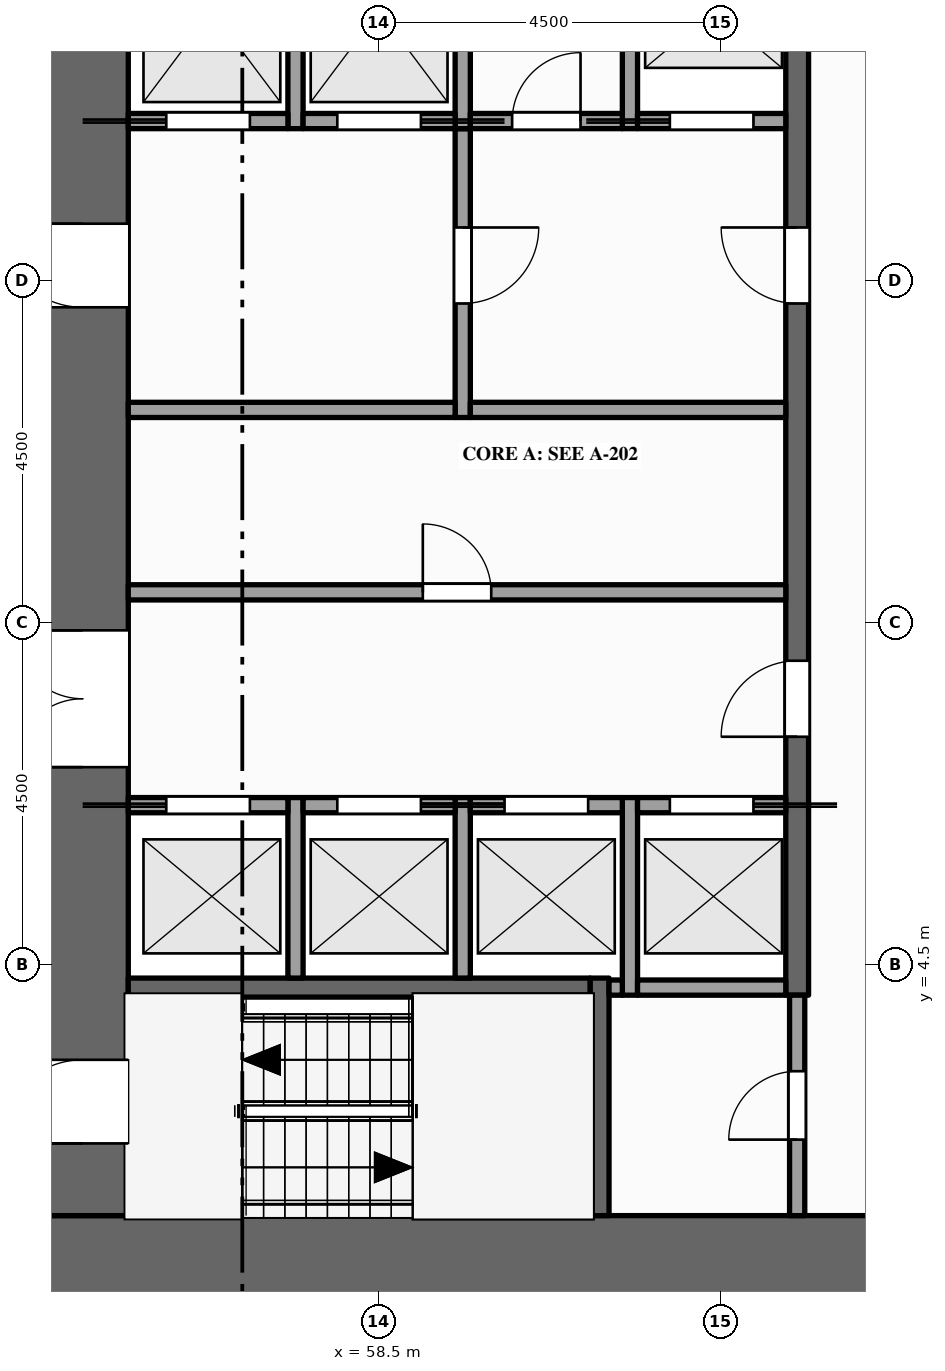
"""IFC4 building model, lengths in metres.
Left out: names, types, materials, properties, quantities, classifications, styles, units other than length and angle.
Written with IfcOpenShell. Run it as: python <this file> out.ifc"""

import sys

from ifc_helpers import new_model, si_unit, direction, frame, frame_2d, origin, place, context, subcontext, project, spatial, rectangle, extrude, element, fill, save


model = new_model("IFC4")
c1 = context("Model", 3, precision=1e-05, world=origin(), true_north=direction((0.0, 1.0)))
c2 = subcontext(c1, "Body", "Model", "MODEL_VIEW")
j1 = project(units=[si_unit("LENGTHUNIT", "METRE"), si_unit("PLANEANGLEUNIT", "RADIAN")], contexts=[c1])
p1 = place(None, origin())
s1 = spatial("IfcSite", under=j1, at=p1, CompositionType="ELEMENT")
p2 = place(p1, origin())
s2 = spatial("IfcBuilding", under=s1, at=p2, CompositionType="ELEMENT")
p3 = place(p2, frame((0.0, 0.0, 8.0)))
s3 = spatial("IfcBuildingStorey", under=s2, at=p3, CompositionType="ELEMENT", Elevation=8.0)
p4 = place(p3, frame((67.5, 0.6, -0.15), z_axis=(0.0, 0.0, 1.0), x_axis=(-1.0, 0.0, 0.0)))
e1 = element("IfcWall", 1, at=p4, inside=s3, PredefinedType="SHEAR", context=c2, shape_type="SweptSolid", body=[
    extrude(rectangle(XDim=13.5, YDim=1.2, at=frame_2d((6.75, 0.0))), origin(), (0.0, 0.0, 1.0), 6.0),
])
p5 = place(p3, frame((54.6, 1.2, -0.15), z_axis=(0.0, 0.0, 1.0), x_axis=(0.0, 1.0, 0.0)))
e2 = element("IfcWall", 2, at=p5, inside=s3, PredefinedType="SHEAR", context=c2, shape_type="SweptSolid", body=[
    extrude(rectangle(XDim=20.1, YDim=1.2, at=frame_2d((10.05, 0.0))), origin(), (0.0, 0.0, 1.0), 6.0),
])
p6 = place(p5, frame((5.9, 0.0, 0.15)))
e3 = element("IfcOpeningElement", 3, at=p6, cuts=e2, PredefinedType="OPENING", context=c2, shape_type="SweptSolid", body=[
    extrude(rectangle(XDim=1.8, YDim=2.1, at=frame_2d((0.9, 1.05))), frame((0.0, 0.61, 0.0), z_axis=(0.0, -1.0, 0.0), x_axis=(1.0, 0.0, 0.0)), (0.0, 0.0, 1.0), 1.22),
])
p7 = place(p5, frame((11.95, 0.0, 0.15)))
e4 = element("IfcOpeningElement", 4, at=p7, cuts=e2, PredefinedType="OPENING", context=c2, shape_type="SweptSolid", body=[
    extrude(rectangle(XDim=1.1, YDim=2.1, at=frame_2d((0.55, 1.05))), frame((0.0, 0.61, 0.0), z_axis=(0.0, -1.0, 0.0), x_axis=(1.0, 0.0, 0.0)), (0.0, 0.0, 1.0), 1.22),
])
p8 = place(p5, frame((0.95, 0.0, 0.15)))
e5 = element("IfcOpeningElement", 5, at=p8, cuts=e2, PredefinedType="OPENING", context=c2, shape_type="SweptSolid", body=[
    extrude(rectangle(XDim=1.1, YDim=2.1, at=frame_2d((0.55, 1.05))), frame((0.0, 0.61, 0.0), z_axis=(0.0, -1.0, 0.0), x_axis=(1.0, 0.0, 0.0)), (0.0, 0.0, 1.0), 1.22),
])
p9 = place(p5, frame((18.15, 0.0, 0.15)))
e6 = element("IfcOpeningElement", 6, at=p9, cuts=e2, PredefinedType="OPENING", context=c2, shape_type="SweptSolid", body=[
    extrude(rectangle(XDim=1.1, YDim=2.1, at=frame_2d((0.55, 1.05))), frame((0.0, 0.61, 0.0), z_axis=(0.0, -1.0, 0.0), x_axis=(1.0, 0.0, 0.0)), (0.0, 0.0, 1.0), 1.22),
])
p10 = place(p3, frame((57.4, 4.325, 0.0), z_axis=(0.0, 0.0, 1.0), x_axis=(0.0, 1.0, 0.0)))
e7 = element("IfcWall", 7, at=p10, inside=s3, PredefinedType="SOLIDWALL", context=c2, shape_type="SweptSolid", body=[
    extrude(rectangle(XDim=2.375, YDim=0.2, at=frame_2d((1.188, 0.0))), origin(), (0.0, 0.0, 1.0), 5.75),
])
p11 = place(p3, frame((57.4, 15.5, 0.0), z_axis=(0.0, 0.0, 1.0), x_axis=(0.0, 1.0, 0.0)))
e8 = element("IfcWall", 8, at=p11, inside=s3, PredefinedType="SOLIDWALL", context=c2, shape_type="SweptSolid", body=[
    extrude(rectangle(XDim=2.875, YDim=0.2, at=frame_2d((1.438, 0.0))), origin(), (0.0, 0.0, 1.0), 5.75),
])
p12 = place(p3, frame((59.6, 4.325, 0.0), z_axis=(0.0, 0.0, 1.0), x_axis=(0.0, 1.0, 0.0)))
e9 = element("IfcWall", 9, at=p12, inside=s3, PredefinedType="SOLIDWALL", context=c2, shape_type="SweptSolid", body=[
    extrude(rectangle(XDim=2.375, YDim=0.2, at=frame_2d((1.188, 0.0))), origin(), (0.0, 0.0, 1.0), 5.75),
])
p13 = place(p3, frame((59.6, 11.7, 0.0), z_axis=(0.0, 0.0, 1.0), x_axis=(0.0, 1.0, 0.0)))
e10 = element("IfcWall", 10, at=p13, inside=s3, PredefinedType="PARTITIONING", context=c2, shape_type="SweptSolid", body=[
    extrude(rectangle(XDim=3.8, YDim=0.2, at=frame_2d((1.9, 0.0))), origin(), (0.0, 0.0, 1.0), 5.75),
])
p14 = place(p13, frame((1.5, 0.0, 0.0)))
e11 = element("IfcOpeningElement", 11, at=p14, cuts=e10, PredefinedType="OPENING", context=c2, shape_type="SweptSolid", body=[
    extrude(rectangle(XDim=1.0, YDim=2.1, at=frame_2d((0.5, 1.05))), frame((0.0, 0.11, 0.0), z_axis=(0.0, -1.0, 0.0), x_axis=(1.0, 0.0, 0.0)), (0.0, 0.0, 1.0), 0.22),
])
p15 = place(p3, frame((59.6, 15.5, 0.0), z_axis=(0.0, 0.0, 1.0), x_axis=(0.0, 1.0, 0.0)))
e12 = element("IfcWall", 12, at=p15, inside=s3, PredefinedType="SOLIDWALL", context=c2, shape_type="SweptSolid", body=[
    extrude(rectangle(XDim=2.875, YDim=0.2, at=frame_2d((1.438, 0.0))), origin(), (0.0, 0.0, 1.0), 5.75),
])
p16 = place(p3, frame((61.4, 1.2, 0.0), z_axis=(0.0, 0.0, 1.0), x_axis=(0.0, 1.0, 0.0)))
e13 = element("IfcWall", 13, at=p16, inside=s3, PredefinedType="SHEAR", context=c2, shape_type="SweptSolid", body=[
    extrude(rectangle(XDim=3.125, YDim=0.25, at=frame_2d((1.562, 0.0))), origin(), (0.0, 0.0, 1.0), 5.75),
])
p17 = place(p3, frame((61.8, 4.1, 0.0), z_axis=(0.0, 0.0, 1.0), x_axis=(0.0, 1.0, 0.0)))
e14 = element("IfcWall", 14, at=p17, inside=s3, PredefinedType="SOLIDWALL", context=c2, shape_type="SweptSolid", body=[
    extrude(rectangle(XDim=2.6, YDim=0.2, at=frame_2d((1.3, 0.0))), origin(), (0.0, 0.0, 1.0), 5.75),
])
p18 = place(p3, frame((61.8, 15.5, 0.0), z_axis=(0.0, 0.0, 1.0), x_axis=(0.0, 1.0, 0.0)))
e15 = element("IfcWall", 15, at=p18, inside=s3, PredefinedType="SOLIDWALL", context=c2, shape_type="SweptSolid", body=[
    extrude(rectangle(XDim=3.1, YDim=0.2, at=frame_2d((1.55, 0.0))), origin(), (0.0, 0.0, 1.0), 5.75),
])
p19 = place(p3, frame((64.0, 1.2, 0.0), z_axis=(0.0, 0.0, 1.0), x_axis=(0.0, 1.0, 0.0)))
e16 = element("IfcWall", 16, at=p19, inside=s3, PredefinedType="PARTITIONING", context=c2, shape_type="SweptSolid", body=[
    extrude(rectangle(XDim=2.9, YDim=0.2, at=frame_2d((1.45, 0.0))), origin(), (0.0, 0.0, 1.0), 5.75),
])
p20 = place(p19, frame((1.0, 0.0, 0.0)))
e17 = element("IfcOpeningElement", 17, at=p20, cuts=e16, PredefinedType="OPENING", context=c2, shape_type="SweptSolid", body=[
    extrude(rectangle(XDim=0.9, YDim=2.1, at=frame_2d((0.45, 1.05))), frame((0.0, 0.11, 0.0), z_axis=(0.0, -1.0, 0.0), x_axis=(1.0, 0.0, 0.0)), (0.0, 0.0, 1.0), 0.22),
])
p21 = place(p3, frame((64.0, 4.1, 0.0), z_axis=(0.0, 0.0, 1.0), x_axis=(0.0, 1.0, 0.0)))
e18 = element("IfcWall", 18, at=p21, inside=s3, PredefinedType="SHEAR", context=c2, shape_type="SweptSolid", body=[
    extrude(rectangle(XDim=14.5, YDim=0.3, at=frame_2d((7.25, 0.0))), origin(), (0.0, 0.0, 1.0), 5.75),
])
p22 = place(p21, frame((3.4, 0.0, 0.0)))
e19 = element("IfcOpeningElement", 19, at=p22, cuts=e18, PredefinedType="OPENING", context=c2, shape_type="SweptSolid", body=[
    extrude(rectangle(XDim=1.0, YDim=2.1, at=frame_2d((0.5, 1.05))), frame((0.0, 0.16, 0.0), z_axis=(0.0, -1.0, 0.0), x_axis=(1.0, 0.0, 0.0)), (0.0, 0.0, 1.0), 0.32),
])
p23 = place(p21, frame((9.1, 0.0, 0.0)))
e20 = element("IfcOpeningElement", 20, at=p23, cuts=e18, PredefinedType="OPENING", context=c2, shape_type="SweptSolid", body=[
    extrude(rectangle(XDim=1.0, YDim=2.1, at=frame_2d((0.5, 1.05))), frame((0.0, 0.16, 0.0), z_axis=(0.0, -1.0, 0.0), x_axis=(1.0, 0.0, 0.0)), (0.0, 0.0, 1.0), 0.32),
])
p24 = place(p3, frame((55.2, 4.2, 0.0), z_axis=(0.0, 0.0, 1.0), x_axis=(1.0, 0.0, 0.0)))
e21 = element("IfcWall", 21, at=p24, inside=s3, PredefinedType="SHEAR", context=c2, shape_type="SweptSolid", body=[
    extrude(rectangle(XDim=6.075, YDim=0.25, at=frame_2d((3.038, 0.0))), origin(), (0.0, 0.0, 1.0), 5.75),
])
p25 = place(p3, frame((61.525, 4.2, 0.0), z_axis=(0.0, 0.0, 1.0), x_axis=(1.0, 0.0, 0.0)))
e22 = element("IfcWall", 22, at=p25, inside=s3, PredefinedType="SOLIDWALL", context=c2, shape_type="SweptSolid", body=[
    extrude(rectangle(XDim=0.175, YDim=0.2, at=frame_2d((0.087, 0.0))), origin(), (0.0, 0.0, 1.0), 5.75),
])
p26 = place(p3, frame((61.9, 4.2, 0.0), z_axis=(0.0, 0.0, 1.0), x_axis=(1.0, 0.0, 0.0)))
e23 = element("IfcWall", 23, at=p26, inside=s3, PredefinedType="SOLIDWALL", context=c2, shape_type="SweptSolid", body=[
    extrude(rectangle(XDim=1.95, YDim=0.2, at=frame_2d((0.975, 0.0))), origin(), (0.0, 0.0, 1.0), 5.75),
])
p27 = place(p3, frame((55.2, 6.6, 0.0), z_axis=(0.0, 0.0, 1.0), x_axis=(1.0, 0.0, 0.0)))
e24 = element("IfcWall", 24, at=p27, inside=s3, PredefinedType="SOLIDWALL", context=c2, shape_type="SweptSolid", body=[
    extrude(rectangle(XDim=2.1, YDim=0.2, at=frame_2d((1.05, 0.0))), origin(), (0.0, 0.0, 1.0), 5.75),
])
p28 = place(p27, frame((0.5, 0.0, 0.012)))
e25 = element("IfcOpeningElement", 25, at=p28, cuts=e24, PredefinedType="OPENING", context=c2, shape_type="SweptSolid", body=[
    extrude(rectangle(XDim=1.1, YDim=2.1, at=frame_2d((0.55, 1.05))), frame((0.0, 0.11, 0.0), z_axis=(0.0, -1.0, 0.0), x_axis=(1.0, 0.0, 0.0)), (0.0, 0.0, 1.0), 0.22),
])
p29 = place(p3, frame((57.5, 6.6, 0.0), z_axis=(0.0, 0.0, 1.0), x_axis=(1.0, 0.0, 0.0)))
e26 = element("IfcWall", 26, at=p29, inside=s3, PredefinedType="SOLIDWALL", context=c2, shape_type="SweptSolid", body=[
    extrude(rectangle(XDim=2.0, YDim=0.2, at=frame_2d((1.0, 0.0))), origin(), (0.0, 0.0, 1.0), 5.75),
])
p30 = place(p29, frame((0.45, 0.0, 0.012)))
e27 = element("IfcOpeningElement", 27, at=p30, cuts=e26, PredefinedType="OPENING", context=c2, shape_type="SweptSolid", body=[
    extrude(rectangle(XDim=1.1, YDim=2.1, at=frame_2d((0.55, 1.05))), frame((0.0, 0.11, 0.0), z_axis=(0.0, -1.0, 0.0), x_axis=(1.0, 0.0, 0.0)), (0.0, 0.0, 1.0), 0.22),
])
p31 = place(p3, frame((59.7, 6.6, 0.0), z_axis=(0.0, 0.0, 1.0), x_axis=(1.0, 0.0, 0.0)))
e28 = element("IfcWall", 28, at=p31, inside=s3, PredefinedType="SOLIDWALL", context=c2, shape_type="SweptSolid", body=[
    extrude(rectangle(XDim=2.0, YDim=0.2, at=frame_2d((1.0, 0.0))), origin(), (0.0, 0.0, 1.0), 5.75),
])
p32 = place(p31, frame((0.45, 0.0, 0.012)))
e29 = element("IfcOpeningElement", 29, at=p32, cuts=e28, PredefinedType="OPENING", context=c2, shape_type="SweptSolid", body=[
    extrude(rectangle(XDim=1.1, YDim=2.1, at=frame_2d((0.55, 1.05))), frame((0.0, 0.11, 0.0), z_axis=(0.0, -1.0, 0.0), x_axis=(1.0, 0.0, 0.0)), (0.0, 0.0, 1.0), 0.22),
])
p33 = place(p3, frame((61.9, 6.6, 0.0), z_axis=(0.0, 0.0, 1.0), x_axis=(1.0, 0.0, 0.0)))
e30 = element("IfcWall", 30, at=p33, inside=s3, PredefinedType="SOLIDWALL", context=c2, shape_type="SweptSolid", body=[
    extrude(rectangle(XDim=1.95, YDim=0.2, at=frame_2d((0.975, 0.0))), origin(), (0.0, 0.0, 1.0), 5.75),
])
p34 = place(p33, frame((0.425, 0.0, 0.012)))
e31 = element("IfcOpeningElement", 31, at=p34, cuts=e30, PredefinedType="OPENING", context=c2, shape_type="SweptSolid", body=[
    extrude(rectangle(XDim=1.1, YDim=2.1, at=frame_2d((0.55, 1.05))), frame((0.0, 0.11, 0.0), z_axis=(0.0, -1.0, 0.0), x_axis=(1.0, 0.0, 0.0)), (0.0, 0.0, 1.0), 0.22),
])
p35 = place(p3, frame((55.2, 9.4, 0.0), z_axis=(0.0, 0.0, 1.0), x_axis=(1.0, 0.0, 0.0)))
e32 = element("IfcWall", 32, at=p35, inside=s3, PredefinedType="PARTITIONING", context=c2, shape_type="SweptSolid", body=[
    extrude(rectangle(XDim=8.65, YDim=0.2, at=frame_2d((4.325, 0.0))), origin(), (0.0, 0.0, 1.0), 5.75),
])
p36 = place(p35, frame((3.875, 0.0, 0.0)))
e33 = element("IfcOpeningElement", 33, at=p36, cuts=e32, PredefinedType="OPENING", context=c2, shape_type="SweptSolid", body=[
    extrude(rectangle(XDim=0.9, YDim=2.1, at=frame_2d((0.45, 1.05))), frame((0.0, 0.11, 0.0), z_axis=(0.0, -1.0, 0.0), x_axis=(1.0, 0.0, 0.0)), (0.0, 0.0, 1.0), 0.22),
])
p37 = place(p3, frame((55.2, 11.8, 0.0), z_axis=(0.0, 0.0, 1.0), x_axis=(1.0, 0.0, 0.0)))
e34 = element("IfcWall", 34, at=p37, inside=s3, PredefinedType="PARTITIONING", context=c2, shape_type="SweptSolid", body=[
    extrude(rectangle(XDim=4.3, YDim=0.2, at=frame_2d((2.15, 0.0))), origin(), (0.0, 0.0, 1.0), 5.75),
])
p38 = place(p3, frame((59.7, 11.8, 0.0), z_axis=(0.0, 0.0, 1.0), x_axis=(1.0, 0.0, 0.0)))
e35 = element("IfcWall", 35, at=p38, inside=s3, PredefinedType="PARTITIONING", context=c2, shape_type="SweptSolid", body=[
    extrude(rectangle(XDim=4.15, YDim=0.2, at=frame_2d((2.075, 0.0))), origin(), (0.0, 0.0, 1.0), 5.75),
])
p39 = place(p3, frame((55.2, 15.6, 0.0), z_axis=(0.0, 0.0, 1.0), x_axis=(1.0, 0.0, 0.0)))
e36 = element("IfcWall", 36, at=p39, inside=s3, PredefinedType="SOLIDWALL", context=c2, shape_type="SweptSolid", body=[
    extrude(rectangle(XDim=2.1, YDim=0.2, at=frame_2d((1.05, 0.0))), origin(), (0.0, 0.0, 1.0), 5.75),
])
p40 = place(p39, frame((0.5, 0.0, 0.012)))
e37 = element("IfcOpeningElement", 37, at=p40, cuts=e36, PredefinedType="OPENING", context=c2, shape_type="SweptSolid", body=[
    extrude(rectangle(XDim=1.1, YDim=2.1, at=frame_2d((0.55, 1.05))), frame((0.0, 0.11, 0.0), z_axis=(0.0, -1.0, 0.0), x_axis=(1.0, 0.0, 0.0)), (0.0, 0.0, 1.0), 0.22),
])
p41 = place(p3, frame((57.5, 15.6, 0.0), z_axis=(0.0, 0.0, 1.0), x_axis=(1.0, 0.0, 0.0)))
e38 = element("IfcWall", 38, at=p41, inside=s3, PredefinedType="SOLIDWALL", context=c2, shape_type="SweptSolid", body=[
    extrude(rectangle(XDim=2.0, YDim=0.2, at=frame_2d((1.0, 0.0))), origin(), (0.0, 0.0, 1.0), 5.75),
])
p42 = place(p41, frame((0.45, 0.0, 0.012)))
e39 = element("IfcOpeningElement", 39, at=p42, cuts=e38, PredefinedType="OPENING", context=c2, shape_type="SweptSolid", body=[
    extrude(rectangle(XDim=1.1, YDim=2.1, at=frame_2d((0.55, 1.05))), frame((0.0, 0.11, 0.0), z_axis=(0.0, -1.0, 0.0), x_axis=(1.0, 0.0, 0.0)), (0.0, 0.0, 1.0), 0.22),
])
p43 = place(p3, frame((59.7, 15.6, 0.0), z_axis=(0.0, 0.0, 1.0), x_axis=(1.0, 0.0, 0.0)))
e40 = element("IfcWall", 40, at=p43, inside=s3, PredefinedType="PARTITIONING", context=c2, shape_type="SweptSolid", body=[
    extrude(rectangle(XDim=2.0, YDim=0.2, at=frame_2d((1.0, 0.0))), origin(), (0.0, 0.0, 1.0), 5.75),
])
p44 = place(p43, frame((0.55, 0.0, 0.0)))
e41 = element("IfcOpeningElement", 41, at=p44, cuts=e40, PredefinedType="OPENING", context=c2, shape_type="SweptSolid", body=[
    extrude(rectangle(XDim=0.9, YDim=2.1, at=frame_2d((0.45, 1.05))), frame((0.0, 0.11, 0.0), z_axis=(0.0, -1.0, 0.0), x_axis=(1.0, 0.0, 0.0)), (0.0, 0.0, 1.0), 0.22),
])
p45 = place(p3, frame((61.9, 15.6, 0.0), z_axis=(0.0, 0.0, 1.0), x_axis=(1.0, 0.0, 0.0)))
e42 = element("IfcWall", 42, at=p45, inside=s3, PredefinedType="SOLIDWALL", context=c2, shape_type="SweptSolid", body=[
    extrude(rectangle(XDim=1.95, YDim=0.2, at=frame_2d((0.975, 0.0))), origin(), (0.0, 0.0, 1.0), 5.75),
])
p46 = place(p45, frame((0.425, 0.0, 0.012)))
e43 = element("IfcOpeningElement", 43, at=p46, cuts=e42, PredefinedType="OPENING", context=c2, shape_type="SweptSolid", body=[
    extrude(rectangle(XDim=1.1, YDim=2.1, at=frame_2d((0.55, 1.05))), frame((0.0, 0.11, 0.0), z_axis=(0.0, -1.0, 0.0), x_axis=(1.0, 0.0, 0.0)), (0.0, 0.0, 1.0), 0.22),
])
p47 = place(p28, origin())
e44 = element("IfcDoor", 44, at=p47, inside=s3, OperationType="SLIDING_TO_LEFT", PredefinedType="DOOR", context=c2, shape_type="SweptSolid", body=[
    extrude(rectangle(XDim=1.1, YDim=2.1, at=frame_2d((0.55, 1.05))), frame((0.0, 0.025, 0.0), z_axis=(0.0, -1.0, 0.0), x_axis=(1.0, 0.0, 0.0)), (0.0, 0.0, 1.0), 0.05),
])
fill(e25, e44)
p48 = place(p30, origin())
e45 = element("IfcDoor", 45, at=p48, inside=s3, OperationType="SLIDING_TO_RIGHT", PredefinedType="DOOR", context=c2, shape_type="SweptSolid", body=[
    extrude(rectangle(XDim=1.1, YDim=2.1, at=frame_2d((0.55, 1.05))), frame((0.0, 0.025, 0.0), z_axis=(0.0, -1.0, 0.0), x_axis=(1.0, 0.0, 0.0)), (0.0, 0.0, 1.0), 0.05),
])
fill(e27, e45)
p49 = place(p32, origin())
e46 = element("IfcDoor", 46, at=p49, inside=s3, OperationType="SLIDING_TO_LEFT", PredefinedType="DOOR", context=c2, shape_type="SweptSolid", body=[
    extrude(rectangle(XDim=1.1, YDim=2.1, at=frame_2d((0.55, 1.05))), frame((0.0, 0.025, 0.0), z_axis=(0.0, -1.0, 0.0), x_axis=(1.0, 0.0, 0.0)), (0.0, 0.0, 1.0), 0.05),
])
fill(e29, e46)
p50 = place(p34, origin())
e47 = element("IfcDoor", 47, at=p50, inside=s3, OperationType="SLIDING_TO_RIGHT", PredefinedType="DOOR", context=c2, shape_type="SweptSolid", body=[
    extrude(rectangle(XDim=1.1, YDim=2.1, at=frame_2d((0.55, 1.05))), frame((0.0, 0.025, 0.0), z_axis=(0.0, -1.0, 0.0), x_axis=(1.0, 0.0, 0.0)), (0.0, 0.0, 1.0), 0.05),
])
fill(e31, e47)
p51 = place(p40, origin())
e48 = element("IfcDoor", 48, at=p51, inside=s3, OperationType="SLIDING_TO_LEFT", PredefinedType="DOOR", context=c2, shape_type="SweptSolid", body=[
    extrude(rectangle(XDim=1.1, YDim=2.1, at=frame_2d((0.55, 1.05))), frame((0.0, 0.025, 0.0), z_axis=(0.0, -1.0, 0.0), x_axis=(1.0, 0.0, 0.0)), (0.0, 0.0, 1.0), 0.05),
])
fill(e37, e48)
p52 = place(p42, origin())
e49 = element("IfcDoor", 49, at=p52, inside=s3, OperationType="SLIDING_TO_RIGHT", PredefinedType="DOOR", context=c2, shape_type="SweptSolid", body=[
    extrude(rectangle(XDim=1.1, YDim=2.1, at=frame_2d((0.55, 1.05))), frame((0.0, 0.025, 0.0), z_axis=(0.0, -1.0, 0.0), x_axis=(1.0, 0.0, 0.0)), (0.0, 0.0, 1.0), 0.05),
])
fill(e39, e49)
p53 = place(p46, origin())
e50 = element("IfcDoor", 50, at=p53, inside=s3, OperationType="SLIDING_TO_LEFT", PredefinedType="DOOR", context=c2, shape_type="SweptSolid", body=[
    extrude(rectangle(XDim=1.1, YDim=2.1, at=frame_2d((0.55, 1.05))), frame((0.0, 0.025, 0.0), z_axis=(0.0, -1.0, 0.0), x_axis=(1.0, 0.0, 0.0)), (0.0, 0.0, 1.0), 0.05),
])
fill(e43, e50)
p54 = place(p6, origin())
e51 = element("IfcDoor", 51, at=p54, inside=s3, OperationType="DOUBLE_DOOR_SINGLE_SWING", PredefinedType="DOOR", context=c2, shape_type="SweptSolid", body=[
    extrude(rectangle(XDim=1.8, YDim=2.1, at=frame_2d((0.9, 1.05))), frame((0.0, 0.025, 0.0), z_axis=(0.0, -1.0, 0.0), x_axis=(1.0, 0.0, 0.0)), (0.0, 0.0, 1.0), 0.05),
])
fill(e3, e51)
p55 = place(p22, origin())
e52 = element("IfcDoor", 52, at=p55, inside=s3, OperationType="SINGLE_SWING_LEFT", PredefinedType="DOOR", context=c2, shape_type="SweptSolid", body=[
    extrude(rectangle(XDim=1.0, YDim=2.1, at=frame_2d((0.5, 1.05))), frame((0.0, 0.025, 0.0), z_axis=(0.0, -1.0, 0.0), x_axis=(1.0, 0.0, 0.0)), (0.0, 0.0, 1.0), 0.05),
])
fill(e19, e52)
p56 = place(p7, origin())
e53 = element("IfcDoor", 53, at=p56, inside=s3, OperationType="SINGLE_SWING_RIGHT", PredefinedType="DOOR", context=c2, shape_type="SweptSolid", body=[
    extrude(rectangle(XDim=1.1, YDim=2.1, at=frame_2d((0.55, 1.05))), frame((0.0, 0.025, 0.0), z_axis=(0.0, -1.0, 0.0), x_axis=(1.0, 0.0, 0.0)), (0.0, 0.0, 1.0), 0.05),
])
fill(e4, e53)
p57 = place(p14, origin())
e54 = element("IfcDoor", 54, at=p57, inside=s3, OperationType="SINGLE_SWING_RIGHT", PredefinedType="DOOR", context=c2, shape_type="SweptSolid", body=[
    extrude(rectangle(XDim=1.0, YDim=2.1, at=frame_2d((0.5, 1.05))), frame((0.0, 0.025, 0.0), z_axis=(0.0, -1.0, 0.0), x_axis=(1.0, 0.0, 0.0)), (0.0, 0.0, 1.0), 0.05),
])
fill(e11, e54)
p58 = place(p23, origin())
e55 = element("IfcDoor", 55, at=p58, inside=s3, OperationType="SINGLE_SWING_RIGHT", PredefinedType="DOOR", context=c2, shape_type="SweptSolid", body=[
    extrude(rectangle(XDim=1.0, YDim=2.1, at=frame_2d((0.5, 1.05))), frame((0.0, 0.025, 0.0), z_axis=(0.0, -1.0, 0.0), x_axis=(1.0, 0.0, 0.0)), (0.0, 0.0, 1.0), 0.05),
])
fill(e20, e55)
p59 = place(p8, origin())
e56 = element("IfcDoor", 56, at=p59, inside=s3, OperationType="SINGLE_SWING_LEFT", PredefinedType="DOOR", context=c2, shape_type="SweptSolid", body=[
    extrude(rectangle(XDim=1.1, YDim=2.1, at=frame_2d((0.55, 1.05))), frame((0.0, 0.025, 0.0), z_axis=(0.0, -1.0, 0.0), x_axis=(1.0, 0.0, 0.0)), (0.0, 0.0, 1.0), 0.05),
])
fill(e5, e56)
p60 = place(p20, origin())
e57 = element("IfcDoor", 57, at=p60, inside=s3, OperationType="SINGLE_SWING_LEFT", PredefinedType="DOOR", context=c2, shape_type="SweptSolid", body=[
    extrude(rectangle(XDim=0.9, YDim=2.1, at=frame_2d((0.45, 1.05))), frame((0.0, 0.025, 0.0), z_axis=(0.0, -1.0, 0.0), x_axis=(1.0, 0.0, 0.0)), (0.0, 0.0, 1.0), 0.05),
])
fill(e17, e57)
p61 = place(p36, origin())
e58 = element("IfcDoor", 58, at=p61, inside=s3, OperationType="SINGLE_SWING_LEFT", PredefinedType="DOOR", context=c2, shape_type="SweptSolid", body=[
    extrude(rectangle(XDim=0.9, YDim=2.1, at=frame_2d((0.45, 1.05))), frame((0.0, 0.025, 0.0), z_axis=(0.0, -1.0, 0.0), x_axis=(1.0, 0.0, 0.0)), (0.0, 0.0, 1.0), 0.05),
])
fill(e33, e58)
p62 = place(p44, origin())
e59 = element("IfcDoor", 59, at=p62, inside=s3, OperationType="SINGLE_SWING_RIGHT", PredefinedType="DOOR", context=c2, shape_type="SweptSolid", body=[
    extrude(rectangle(XDim=0.9, YDim=2.1, at=frame_2d((0.45, 1.05))), frame((0.0, 0.025, 0.0), z_axis=(0.0, -1.0, 0.0), x_axis=(1.0, 0.0, 0.0)), (0.0, 0.0, 1.0), 0.05),
])
fill(e41, e59)
save(model, sys.argv[1])
